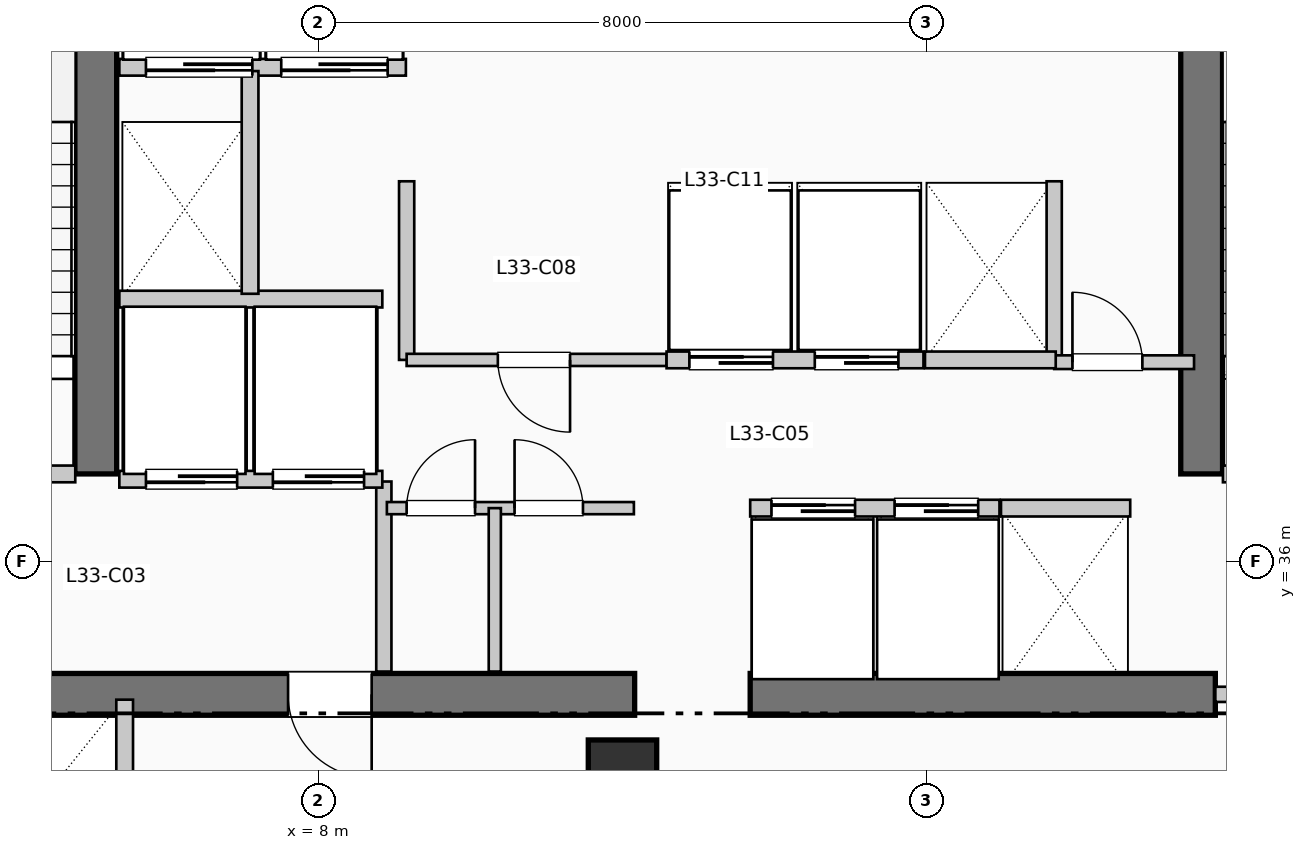
"""IFC4 building model, lengths in metres.
Left out: names, types, materials, properties, quantities, classifications, styles, units other than length and angle.
Written with IfcOpenShell. Run it as: python <this file> out.ifc"""

import sys

from ifc_helpers import new_model, si_unit, direction, frame, frame_2d, origin, origin_2d, place, context, subcontext, project, spatial, rectangle, extrude, element, fill, save


model = new_model("IFC4")
c1 = context("Model", 3, precision=1e-05, world=origin(), true_north=direction((0.0, 1.0)))
c2 = subcontext(c1, "Body", "Model", "MODEL_VIEW")
j1 = project(units=[si_unit("LENGTHUNIT", "METRE"), si_unit("PLANEANGLEUNIT", "RADIAN")], contexts=[c1])
p1 = place(None, origin())
s1 = spatial("IfcSite", under=j1, at=p1, CompositionType="ELEMENT")
p2 = place(p1, origin())
s2 = spatial("IfcBuilding", under=s1, at=p2, CompositionType="ELEMENT")
p3 = place(p2, frame((0.0, 0.0, 138.93)))
s3 = spatial("IfcBuildingStorey", under=s2, at=p3, CompositionType="ELEMENT", Elevation=138.93)
p4 = place(p3, frame((1.45, 34.25, 0.0), z_axis=(0.0, 0.0, 1.0), x_axis=(1.0, 0.0, 0.0)))
e1 = element("IfcWall", 1, at=p4, inside=s3, PredefinedType="SHEAR", context=c2, shape_type="SweptSolid", body=[
    extrude(rectangle(XDim=10.71, YDim=0.55, at=frame_2d((5.355, 0.0))), origin(), (0.0, 0.0, 1.0), 3.96),
])
p5 = place(p4, frame((7.25, 0.0, 0.0), z_axis=(0.0, 0.0, 1.0), x_axis=(-1.0, 0.0, 0.0)))
e2 = element("IfcOpeningElement", 2, at=p5, cuts=e1, PredefinedType="OPENING", context=c2, shape_type="SweptSolid", body=[
    extrude(rectangle(XDim=1.1, YDim=2.15, at=frame_2d((0.55, 1.075))), frame((0.0, 0.285, 0.0), z_axis=(0.0, -1.0, 0.0), x_axis=(1.0, 0.0, 0.0)), (0.0, 0.0, 1.0), 0.57),
])
p6 = place(p3, frame((13.68, 34.25, 0.0), z_axis=(0.0, 0.0, 1.0), x_axis=(1.0, 0.0, 0.0)))
e3 = element("IfcWall", 3, at=p6, inside=s3, PredefinedType="SHEAR", context=c2, shape_type="SweptSolid", body=[
    extrude(rectangle(XDim=6.12, YDim=0.55, at=frame_2d((3.06, 0.0))), origin(), (0.0, 0.0, 1.0), 3.96),
])
for number, where, z_axis, x_axis in (
    (4, (5.07, 37.15, 0.0), (0.0, 0.0, 1.0), (0.0, 1.0, 0.0)),
    (5, (19.62, 37.15, 0.0), (0.0, 0.0, 1.0), (0.0, 1.0, 0.0)),
):
    element("IfcWall", number, at=place(p3, frame(where, z_axis=z_axis, x_axis=x_axis)), inside=s3, PredefinedType="SHEAR", context=c2, shape_type="SweptSolid", body=[
        extrude(rectangle(XDim=7.89, YDim=0.55, at=frame_2d((3.945, 0.0))), origin(), (0.0, 0.0, 1.0), 3.96),
    ])
p7 = place(p3, frame((12.0, 33.2, 0.0), z_axis=(0.0, 0.0, 1.0), x_axis=(1.0, 0.0, 0.0)))
e6 = element("IfcColumn", 6, at=p7, inside=s3, PredefinedType="COLUMN", context=c2, shape_type="SweptSolid", body=[
    extrude(rectangle(XDim=0.9, YDim=0.9, at=origin_2d()), origin(), (0.0, 0.0, 1.0), 3.96),
])
p8 = place(p3, frame((1.65, 37.15, 0.0), z_axis=(0.0, 0.0, 1.0), x_axis=(1.0, 0.0, 0.0)))
e7 = element("IfcWall", 7, at=p8, inside=s3, PredefinedType="PARTITIONING", context=c2, shape_type="SweptSolid", body=[
    extrude(rectangle(XDim=3.15, YDim=0.22, at=frame_2d((1.575, 0.0))), origin(), (0.0, 0.0, 1.0), 3.71),
])
p9 = place(p8, frame((2.05, 0.0, 0.0), z_axis=(0.0, 0.0, 1.0), x_axis=(-1.0, 0.0, 0.0)))
e8 = element("IfcOpeningElement", 8, at=p9, cuts=e7, PredefinedType="OPENING", context=c2, shape_type="SweptSolid", body=[
    extrude(rectangle(XDim=1.05, YDim=2.15, at=frame_2d((0.525, 1.075))), frame((0.0, 0.12, 0.0), z_axis=(0.0, -1.0, 0.0), x_axis=(1.0, 0.0, 0.0)), (0.0, 0.0, 1.0), 0.24),
])
p10 = place(p3, frame((8.86, 34.55, 0.0), z_axis=(0.0, 0.0, 1.0), x_axis=(0.0, 1.0, 0.0)))
e9 = element("IfcWall", 9, at=p10, inside=s3, PredefinedType="PARTITIONING", context=c2, shape_type="SweptSolid", body=[
    extrude(rectangle(XDim=2.5, YDim=0.2, at=frame_2d((1.25, 0.0))), origin(), (0.0, 0.0, 1.0), 3.71),
])
p11 = place(p3, frame((19.9, 37.15, 0.0), z_axis=(0.0, 0.0, 1.0), x_axis=(1.0, 0.0, 0.0)))
e10 = element("IfcWall", 10, at=p11, inside=s3, PredefinedType="PARTITIONING", context=c2, shape_type="SweptSolid", body=[
    extrude(rectangle(XDim=3.15, YDim=0.22, at=frame_2d((1.575, 0.0))), origin(), (0.0, 0.0, 1.0), 3.71),
])
p12 = place(p11, frame((2.05, 0.0, 0.0), z_axis=(0.0, 0.0, 1.0), x_axis=(-1.0, 0.0, 0.0)))
e11 = element("IfcOpeningElement", 11, at=p12, cuts=e10, PredefinedType="OPENING", context=c2, shape_type="SweptSolid", body=[
    extrude(rectangle(XDim=1.05, YDim=2.15, at=frame_2d((0.525, 1.075))), frame((0.0, 0.12, 0.0), z_axis=(0.0, -1.0, 0.0), x_axis=(1.0, 0.0, 0.0)), (0.0, 0.0, 1.0), 0.24),
])
p13 = place(p3, frame((19.8, 34.25, 0.0), z_axis=(0.0, 0.0, 1.0), x_axis=(1.0, 0.0, 0.0)))
e12 = element("IfcWall", 12, at=p13, inside=s3, PredefinedType="PARTITIONING", context=c2, shape_type="SweptSolid", body=[
    extrude(rectangle(XDim=3.25, YDim=0.2, at=frame_2d((1.625, 0.0))), origin(), (0.0, 0.0, 1.0), 3.71),
])
p14 = place(p13, frame((2.15, 0.0, 0.0), z_axis=(0.0, 0.0, 1.0), x_axis=(-1.0, 0.0, 0.0)))
e13 = element("IfcOpeningElement", 13, at=p14, cuts=e12, PredefinedType="OPENING", context=c2, shape_type="SweptSolid", body=[
    extrude(rectangle(XDim=1.1, YDim=2.15, at=frame_2d((0.55, 1.075))), frame((0.0, 0.11, 0.0), z_axis=(0.0, -1.0, 0.0), x_axis=(1.0, 0.0, 0.0)), (0.0, 0.0, 1.0), 0.22),
])
p15 = place(p3, frame((5.38, 37.08, 0.0), z_axis=(0.0, 0.0, 1.0), x_axis=(1.0, 0.0, 0.0)))
e14 = element("IfcWall", 14, at=p15, inside=s3, PredefinedType="PARTITIONING", context=c2, shape_type="SweptSolid", body=[
    extrude(rectangle(XDim=3.46, YDim=0.22, at=frame_2d((1.73, 0.0))), origin(), (0.0, 0.0, 1.0), 3.71),
])
p16 = place(p15, frame((1.55, 0.0, 0.0), z_axis=(0.0, 0.0, 1.0), x_axis=(-1.0, 0.0, 0.0)))
e15 = element("IfcOpeningElement", 15, at=p16, cuts=e14, PredefinedType="OPENING", context=c2, shape_type="SweptSolid", body=[
    extrude(rectangle(XDim=1.2, YDim=2.2, at=frame_2d((0.6, 1.1))), frame((0.0, 0.12, 0.0), z_axis=(0.0, -1.0, 0.0), x_axis=(1.0, 0.0, 0.0)), (0.0, 0.0, 1.0), 0.24),
])
p17 = place(p15, frame((3.22, 0.0, 0.0), z_axis=(0.0, 0.0, 1.0), x_axis=(-1.0, 0.0, 0.0)))
e16 = element("IfcOpeningElement", 16, at=p17, cuts=e14, PredefinedType="OPENING", context=c2, shape_type="SweptSolid", body=[
    extrude(rectangle(XDim=1.2, YDim=2.2, at=frame_2d((0.6, 1.1))), frame((0.0, 0.12, 0.0), z_axis=(0.0, -1.0, 0.0), x_axis=(1.0, 0.0, 0.0)), (0.0, 0.0, 1.0), 0.24),
])
p18 = place(p3, frame((5.38, 39.45, 0.0), z_axis=(0.0, 0.0, 1.0), x_axis=(1.0, 0.0, 0.0)))
e17 = element("IfcWall", 17, at=p18, inside=s3, PredefinedType="PARTITIONING", context=c2, shape_type="SweptSolid", body=[
    extrude(rectangle(XDim=3.46, YDim=0.22, at=frame_2d((1.73, 0.0))), origin(), (0.0, 0.0, 1.0), 3.71),
])
p19 = place(p3, frame((5.38, 42.5, 0.0), z_axis=(0.0, 0.0, 1.0), x_axis=(1.0, 0.0, 0.0)))
e18 = element("IfcWall", 18, at=p19, inside=s3, PredefinedType="PARTITIONING", context=c2, shape_type="SweptSolid", body=[
    extrude(rectangle(XDim=3.77, YDim=0.22, at=frame_2d((1.885, 0.0))), origin(), (0.0, 0.0, 1.0), 3.71),
])
p20 = place(p19, frame((1.75, 0.0, 0.0), z_axis=(0.0, 0.0, 1.0), x_axis=(-1.0, 0.0, 0.0)))
e19 = element("IfcOpeningElement", 19, at=p20, cuts=e18, PredefinedType="OPENING", context=c2, shape_type="SweptSolid", body=[
    extrude(rectangle(XDim=1.4, YDim=2.2, at=frame_2d((0.7, 1.1))), frame((0.0, 0.12, 0.0), z_axis=(0.0, -1.0, 0.0), x_axis=(1.0, 0.0, 0.0)), (0.0, 0.0, 1.0), 0.24),
])
p21 = place(p19, frame((3.53, 0.0, 0.0), z_axis=(0.0, 0.0, 1.0), x_axis=(-1.0, 0.0, 0.0)))
e20 = element("IfcOpeningElement", 20, at=p21, cuts=e18, PredefinedType="OPENING", context=c2, shape_type="SweptSolid", body=[
    extrude(rectangle(XDim=1.4, YDim=2.2, at=frame_2d((0.7, 1.1))), frame((0.0, 0.12, 0.0), z_axis=(0.0, -1.0, 0.0), x_axis=(1.0, 0.0, 0.0)), (0.0, 0.0, 1.0), 0.24),
])
p22 = place(p3, frame((7.1, 39.52, 0.0), z_axis=(0.0, 0.0, 1.0), x_axis=(0.0, 1.0, 0.0)))
e21 = element("IfcWall", 21, at=p22, inside=s3, PredefinedType="PARTITIONING", context=c2, shape_type="SweptSolid", body=[
    extrude(rectangle(XDim=2.93, YDim=0.22, at=frame_2d((1.465, 0.0))), origin(), (0.0, 0.0, 1.0), 3.71),
])
p23 = place(p3, frame((5.45, 31.8, 0.0), z_axis=(0.0, 0.0, 1.0), x_axis=(0.0, 1.0, 0.0)))
e22 = element("IfcWall", 22, at=p23, inside=s3, PredefinedType="PARTITIONING", context=c2, shape_type="SweptSolid", body=[
    extrude(rectangle(XDim=2.38, YDim=0.22, at=frame_2d((1.19, 0.0))), origin(), (0.0, 0.0, 1.0), 3.71),
])
for number, where, z_axis, x_axis in (
    (23, (9.16, 38.65, 0.0), (0.0, 0.0, 1.0), (0.0, 1.0, 0.0)),
    (24, (17.68, 38.65, 0.0), (0.0, 0.0, 1.0), (0.0, 1.0, 0.0)),
):
    element("IfcWall", number, at=place(p3, frame(where, z_axis=z_axis, x_axis=x_axis)), inside=s3, PredefinedType="PARTITIONING", context=c2, shape_type="SweptSolid", body=[
        extrude(rectangle(XDim=2.35, YDim=0.2, at=frame_2d((1.175, 0.0))), origin(), (0.0, 0.0, 1.0), 3.71),
    ])
p24 = place(p3, frame((17.68, 38.62, 0.0), z_axis=(0.0, 0.0, 1.0), x_axis=(1.0, 0.0, 0.0)))
e25 = element("IfcWall", 25, at=p24, inside=s3, PredefinedType="PARTITIONING", context=c2, shape_type="SweptSolid", body=[
    extrude(rectangle(XDim=1.84, YDim=0.18, at=frame_2d((0.92, 0.0))), origin(), (0.0, 0.0, 1.0), 3.71),
])
p25 = place(p24, frame((0.24, 0.0, 0.0)))
e26 = element("IfcOpeningElement", 26, at=p25, cuts=e25, PredefinedType="OPENING", context=c2, shape_type="SweptSolid", body=[
    extrude(rectangle(XDim=0.92, YDim=2.1, at=frame_2d((0.46, 1.05))), frame((0.0, 0.1, 0.0), z_axis=(0.0, -1.0, 0.0), x_axis=(1.0, 0.0, 0.0)), (0.0, 0.0, 1.0), 0.2),
])
p26 = place(p3, frame((8.9, 36.7, 0.0), z_axis=(0.0, 0.0, 1.0), x_axis=(1.0, 0.0, 0.0)))
e27 = element("IfcWall", 27, at=p26, inside=s3, PredefinedType="PARTITIONING", context=c2, shape_type="SweptSolid", body=[
    extrude(rectangle(XDim=3.25, YDim=0.16, at=frame_2d((1.625, 0.0))), origin(), (0.0, 0.0, 1.0), 3.71),
])
p27 = place(p26, frame((0.26, 0.0, 0.0)))
e28 = element("IfcOpeningElement", 28, at=p27, cuts=e27, PredefinedType="OPENING", context=c2, shape_type="SweptSolid", body=[
    extrude(rectangle(XDim=0.9, YDim=2.15, at=frame_2d((0.45, 1.075))), frame((0.0, 0.09, 0.0), z_axis=(0.0, -1.0, 0.0), x_axis=(1.0, 0.0, 0.0)), (0.0, 0.0, 1.0), 0.18),
])
p28 = place(p26, frame((1.68, 0.0, 0.0)))
e29 = element("IfcOpeningElement", 29, at=p28, cuts=e27, PredefinedType="OPENING", context=c2, shape_type="SweptSolid", body=[
    extrude(rectangle(XDim=0.9, YDim=2.15, at=frame_2d((0.45, 1.075))), frame((0.0, 0.09, 0.0), z_axis=(0.0, -1.0, 0.0), x_axis=(1.0, 0.0, 0.0)), (0.0, 0.0, 1.0), 0.18),
])
p29 = place(p3, frame((10.32, 34.55, 0.0), z_axis=(0.0, 0.0, 1.0), x_axis=(0.0, 1.0, 0.0)))
e30 = element("IfcWall", 30, at=p29, inside=s3, PredefinedType="PARTITIONING", context=c2, shape_type="SweptSolid", body=[
    extrude(rectangle(XDim=2.15, YDim=0.16, at=frame_2d((1.075, 0.0))), origin(), (0.0, 0.0, 1.0), 3.71),
])
p30 = place(p3, frame((9.16, 38.65, 0.0), z_axis=(0.0, 0.0, 1.0), x_axis=(1.0, 0.0, 0.0)))
e31 = element("IfcWall", 31, at=p30, inside=s3, PredefinedType="PARTITIONING", context=c2, shape_type="SweptSolid", body=[
    extrude(rectangle(XDim=3.42, YDim=0.16, at=frame_2d((1.71, 0.0))), origin(), (0.0, 0.0, 1.0), 3.71),
])
p31 = place(p30, frame((2.15, 0.0, 0.0), z_axis=(0.0, 0.0, 1.0), x_axis=(-1.0, 0.0, 0.0)))
e32 = element("IfcOpeningElement", 32, at=p31, cuts=e31, PredefinedType="OPENING", context=c2, shape_type="SweptSolid", body=[
    extrude(rectangle(XDim=0.95, YDim=2.15, at=frame_2d((0.475, 1.075))), frame((0.0, 0.09, 0.0), z_axis=(0.0, -1.0, 0.0), x_axis=(1.0, 0.0, 0.0)), (0.0, 0.0, 1.0), 0.18),
])
p32 = place(p3, frame((13.68, 36.7, 0.0), z_axis=(0.0, 0.0, 1.0), x_axis=(1.0, 0.0, 0.0)))
e33 = element("IfcWall", 33, at=p32, inside=s3, PredefinedType="PARTITIONING", context=c2, shape_type="SweptSolid", body=[
    extrude(rectangle(XDim=3.28, YDim=0.22, at=frame_2d((1.64, 0.0))), origin(), (0.0, 0.0, 1.0), 3.71),
])
p33 = place(p32, frame((0.28, 0.0, 0.0)))
e34 = element("IfcOpeningElement", 34, at=p33, cuts=e33, PredefinedType="OPENING", context=c2, shape_type="SweptSolid", body=[
    extrude(rectangle(XDim=1.1, YDim=2.2, at=frame_2d((0.55, 1.1))), frame((0.0, 0.12, 0.0), z_axis=(0.0, -1.0, 0.0), x_axis=(1.0, 0.0, 0.0)), (0.0, 0.0, 1.0), 0.24),
])
p34 = place(p32, frame((1.9, 0.0, 0.0)))
e35 = element("IfcOpeningElement", 35, at=p34, cuts=e33, PredefinedType="OPENING", context=c2, shape_type="SweptSolid", body=[
    extrude(rectangle(XDim=1.1, YDim=2.2, at=frame_2d((0.55, 1.1))), frame((0.0, 0.12, 0.0), z_axis=(0.0, -1.0, 0.0), x_axis=(1.0, 0.0, 0.0)), (0.0, 0.0, 1.0), 0.24),
])
p35 = place(p3, frame((12.58, 38.65, 0.0), z_axis=(0.0, 0.0, 1.0), x_axis=(1.0, 0.0, 0.0)))
e36 = element("IfcWall", 36, at=p35, inside=s3, PredefinedType="PARTITIONING", context=c2, shape_type="SweptSolid", body=[
    extrude(rectangle(XDim=3.38, YDim=0.22, at=frame_2d((1.69, 0.0))), origin(), (0.0, 0.0, 1.0), 3.71),
])
p36 = place(p35, frame((0.3, 0.0, 0.0)))
e37 = element("IfcOpeningElement", 37, at=p36, cuts=e36, PredefinedType="OPENING", context=c2, shape_type="SweptSolid", body=[
    extrude(rectangle(XDim=1.1, YDim=2.2, at=frame_2d((0.55, 1.1))), frame((0.0, 0.12, 0.0), z_axis=(0.0, -1.0, 0.0), x_axis=(1.0, 0.0, 0.0)), (0.0, 0.0, 1.0), 0.24),
])
p37 = place(p35, frame((1.95, 0.0, 0.0)))
e38 = element("IfcOpeningElement", 38, at=p37, cuts=e36, PredefinedType="OPENING", context=c2, shape_type="SweptSolid", body=[
    extrude(rectangle(XDim=1.1, YDim=2.2, at=frame_2d((0.55, 1.1))), frame((0.0, 0.12, 0.0), z_axis=(0.0, -1.0, 0.0), x_axis=(1.0, 0.0, 0.0)), (0.0, 0.0, 1.0), 0.24),
])
p38 = place(p3, frame((16.98, 36.7, 0.0), z_axis=(0.0, 0.0, 1.0), x_axis=(1.0, 0.0, 0.0)))
e39 = element("IfcWall", 39, at=p38, inside=s3, PredefinedType="PARTITIONING", context=c2, shape_type="SweptSolid", body=[
    extrude(rectangle(XDim=1.7, YDim=0.22, at=frame_2d((0.85, 0.0))), origin(), (0.0, 0.0, 1.0), 3.71),
])
p39 = place(p3, frame((15.98, 38.65, 0.0), z_axis=(0.0, 0.0, 1.0), x_axis=(1.0, 0.0, 0.0)))
e40 = element("IfcWall", 40, at=p39, inside=s3, PredefinedType="PARTITIONING", context=c2, shape_type="SweptSolid", body=[
    extrude(rectangle(XDim=1.72, YDim=0.22, at=frame_2d((0.86, 0.0))), origin(), (0.0, 0.0, 1.0), 3.71),
])
p40 = place(p5, origin())
e41 = element("IfcDoor", 41, at=p40, inside=s3, OperationType="SINGLE_SWING_RIGHT", PredefinedType="DOOR", context=c2, shape_type="SweptSolid", body=[
    extrude(rectangle(XDim=1.1, YDim=2.15, at=frame_2d((0.55, 1.075))), frame((0.0, 0.025, 0.0), z_axis=(0.0, -1.0, 0.0), x_axis=(1.0, 0.0, 0.0)), (0.0, 0.0, 1.0), 0.05),
])
fill(e2, e41)
p41 = place(p16, origin())
e42 = element("IfcDoor", 42, at=p41, inside=s3, OperationType="SLIDING_TO_RIGHT", PredefinedType="DOOR", context=c2, shape_type="SweptSolid", body=[
    extrude(rectangle(XDim=1.2, YDim=2.2, at=frame_2d((0.6, 1.1))), frame((0.0, 0.025, 0.0), z_axis=(0.0, -1.0, 0.0), x_axis=(1.0, 0.0, 0.0)), (0.0, 0.0, 1.0), 0.05),
])
fill(e15, e42)
p42 = place(p17, origin())
e43 = element("IfcDoor", 43, at=p42, inside=s3, OperationType="SLIDING_TO_RIGHT", PredefinedType="DOOR", context=c2, shape_type="SweptSolid", body=[
    extrude(rectangle(XDim=1.2, YDim=2.2, at=frame_2d((0.6, 1.1))), frame((0.0, 0.025, 0.0), z_axis=(0.0, -1.0, 0.0), x_axis=(1.0, 0.0, 0.0)), (0.0, 0.0, 1.0), 0.05),
])
fill(e16, e43)
p43 = place(p20, origin())
e44 = element("IfcDoor", 44, at=p43, inside=s3, OperationType="SLIDING_TO_LEFT", PredefinedType="DOOR", context=c2, shape_type="SweptSolid", body=[
    extrude(rectangle(XDim=1.4, YDim=2.2, at=frame_2d((0.7, 1.1))), frame((0.0, 0.025, 0.0), z_axis=(0.0, -1.0, 0.0), x_axis=(1.0, 0.0, 0.0)), (0.0, 0.0, 1.0), 0.05),
])
fill(e19, e44)
p44 = place(p21, origin())
e45 = element("IfcDoor", 45, at=p44, inside=s3, OperationType="SLIDING_TO_LEFT", PredefinedType="DOOR", context=c2, shape_type="SweptSolid", body=[
    extrude(rectangle(XDim=1.4, YDim=2.2, at=frame_2d((0.7, 1.1))), frame((0.0, 0.025, 0.0), z_axis=(0.0, -1.0, 0.0), x_axis=(1.0, 0.0, 0.0)), (0.0, 0.0, 1.0), 0.05),
])
fill(e20, e45)
p45 = place(p25, origin())
e46 = element("IfcDoor", 46, at=p45, inside=s3, OperationType="SINGLE_SWING_LEFT", PredefinedType="DOOR", context=c2, shape_type="SweptSolid", body=[
    extrude(rectangle(XDim=0.92, YDim=2.1, at=frame_2d((0.46, 1.05))), frame((0.0, 0.025, 0.0), z_axis=(0.0, -1.0, 0.0), x_axis=(1.0, 0.0, 0.0)), (0.0, 0.0, 1.0), 0.05),
])
fill(e26, e46)
p46 = place(p27, origin())
e47 = element("IfcDoor", 47, at=p46, inside=s3, OperationType="SINGLE_SWING_RIGHT", PredefinedType="DOOR", context=c2, shape_type="SweptSolid", body=[
    extrude(rectangle(XDim=0.9, YDim=2.15, at=frame_2d((0.45, 1.075))), frame((0.0, 0.025, 0.0), z_axis=(0.0, -1.0, 0.0), x_axis=(1.0, 0.0, 0.0)), (0.0, 0.0, 1.0), 0.05),
])
fill(e28, e47)
p47 = place(p28, origin())
e48 = element("IfcDoor", 48, at=p47, inside=s3, OperationType="SINGLE_SWING_LEFT", PredefinedType="DOOR", context=c2, shape_type="SweptSolid", body=[
    extrude(rectangle(XDim=0.9, YDim=2.15, at=frame_2d((0.45, 1.075))), frame((0.0, 0.025, 0.0), z_axis=(0.0, -1.0, 0.0), x_axis=(1.0, 0.0, 0.0)), (0.0, 0.0, 1.0), 0.05),
])
fill(e29, e48)
p48 = place(p31, origin())
e49 = element("IfcDoor", 49, at=p48, inside=s3, OperationType="SINGLE_SWING_RIGHT", PredefinedType="DOOR", context=c2, shape_type="SweptSolid", body=[
    extrude(rectangle(XDim=0.95, YDim=2.15, at=frame_2d((0.475, 1.075))), frame((0.0, 0.025, 0.0), z_axis=(0.0, -1.0, 0.0), x_axis=(1.0, 0.0, 0.0)), (0.0, 0.0, 1.0), 0.05),
])
fill(e32, e49)
p49 = place(p33, origin())
e50 = element("IfcDoor", 50, at=p49, inside=s3, OperationType="SLIDING_TO_RIGHT", PredefinedType="DOOR", context=c2, shape_type="SweptSolid", body=[
    extrude(rectangle(XDim=1.1, YDim=2.2, at=frame_2d((0.55, 1.1))), frame((0.0, 0.025, 0.0), z_axis=(0.0, -1.0, 0.0), x_axis=(1.0, 0.0, 0.0)), (0.0, 0.0, 1.0), 0.05),
])
fill(e34, e50)
p50 = place(p34, origin())
e51 = element("IfcDoor", 51, at=p50, inside=s3, OperationType="SLIDING_TO_RIGHT", PredefinedType="DOOR", context=c2, shape_type="SweptSolid", body=[
    extrude(rectangle(XDim=1.1, YDim=2.2, at=frame_2d((0.55, 1.1))), frame((0.0, 0.025, 0.0), z_axis=(0.0, -1.0, 0.0), x_axis=(1.0, 0.0, 0.0)), (0.0, 0.0, 1.0), 0.05),
])
fill(e35, e51)
p51 = place(p36, origin())
e52 = element("IfcDoor", 52, at=p51, inside=s3, OperationType="SLIDING_TO_RIGHT", PredefinedType="DOOR", context=c2, shape_type="SweptSolid", body=[
    extrude(rectangle(XDim=1.1, YDim=2.2, at=frame_2d((0.55, 1.1))), frame((0.0, 0.025, 0.0), z_axis=(0.0, -1.0, 0.0), x_axis=(1.0, 0.0, 0.0)), (0.0, 0.0, 1.0), 0.05),
])
fill(e37, e52)
p52 = place(p37, origin())
e53 = element("IfcDoor", 53, at=p52, inside=s3, OperationType="SLIDING_TO_RIGHT", PredefinedType="DOOR", context=c2, shape_type="SweptSolid", body=[
    extrude(rectangle(XDim=1.1, YDim=2.2, at=frame_2d((0.55, 1.1))), frame((0.0, 0.025, 0.0), z_axis=(0.0, -1.0, 0.0), x_axis=(1.0, 0.0, 0.0)), (0.0, 0.0, 1.0), 0.05),
])
fill(e38, e53)
save(model, sys.argv[1])
